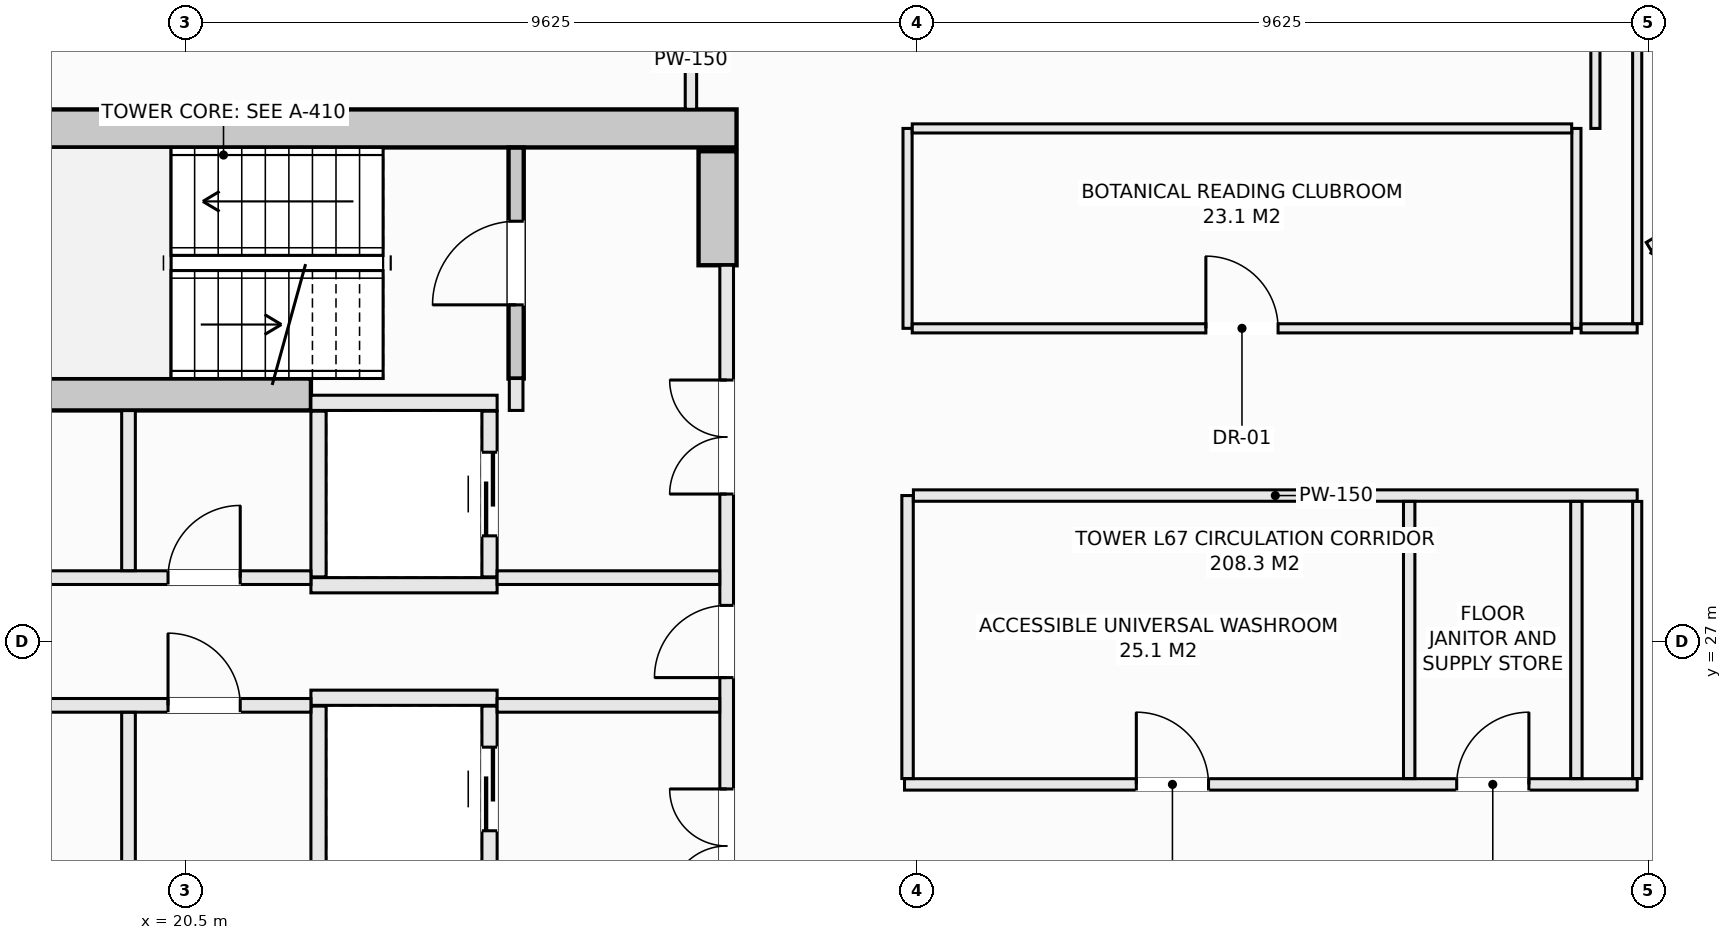
"""IFC4 building model, lengths in metres.
Left out: names, types, materials, properties, quantities, classifications, styles, units other than length and angle.
Written with IfcOpenShell. Run it as: python <this file> out.ifc"""

import sys

from ifc_helpers import new_model, si_unit, direction, frame, frame_2d, origin, place, context, subcontext, project, spatial, rectangle, extrude, element, fill, save


model = new_model("IFC4")
c1 = context("Model", 3, precision=1e-05, world=origin(), true_north=direction((0.0, 1.0)))
c2 = subcontext(c1, "Body", "Model", "MODEL_VIEW")
j1 = project(units=[si_unit("LENGTHUNIT", "METRE"), si_unit("PLANEANGLEUNIT", "RADIAN")], contexts=[c1])
p1 = place(None, origin())
s1 = spatial("IfcSite", under=j1, at=p1, CompositionType="ELEMENT")
p2 = place(p1, origin())
s2 = spatial("IfcBuilding", under=s1, at=p2, CompositionType="ELEMENT")
p3 = place(p2, frame((0.0, 0.0, 249.2)))
s3 = spatial("IfcBuildingStorey", under=s2, at=p3, CompositionType="ELEMENT", Elevation=249.2)
p4 = place(p3, frame((14.25, 33.75, -0.27), z_axis=(0.0, 0.0, 1.0), x_axis=(1.0, 0.0, 0.0)))
e1 = element("IfcWall", 1, at=p4, inside=s3, PredefinedType="SHEAR", context=c2, shape_type="SweptSolid", body=[
    extrude(rectangle(XDim=13.5, YDim=0.5, at=frame_2d((6.75, 0.0))), origin(), (0.0, 0.0, 1.0), 3.3),
])
p5 = place(p3, frame((27.5, 31.95, -0.27), z_axis=(0.0, 0.0, 1.0), x_axis=(0.0, 1.0, 0.0)))
e2 = element("IfcWall", 2, at=p5, inside=s3, PredefinedType="SHEAR", context=c2, shape_type="SweptSolid", body=[
    extrude(rectangle(XDim=1.5, YDim=0.5, at=frame_2d((0.75, 0.0))), origin(), (0.0, 0.0, 1.0), 3.3),
])
p6 = place(p3, frame((14.85, 30.25, -0.27), z_axis=(0.0, 0.0, 1.0), x_axis=(1.0, 0.0, 0.0)))
e3 = element("IfcWall", 3, at=p6, inside=s3, PredefinedType="SHEAR", context=c2, shape_type="SweptSolid", body=[
    extrude(rectangle(XDim=7.3, YDim=0.42, at=frame_2d((3.65, 0.0))), origin(), (0.0, 0.0, 1.0), 3.3),
])
p7 = place(p3, frame((24.85, 30.46, -0.27), z_axis=(0.0, 0.0, 1.0), x_axis=(0.0, 1.0, 0.0)))
e4 = element("IfcWall", 4, at=p7, inside=s3, PredefinedType="SHEAR", context=c2, shape_type="SweptSolid", body=[
    extrude(rectangle(XDim=3.038, YDim=0.2, at=frame_2d((1.519, 0.0))), origin(), (0.0, 0.0, 1.0), 3.3),
])
p8 = place(p7, frame((0.969, 0.0, 0.27)))
e5 = element("IfcOpeningElement", 5, at=p8, cuts=e4, PredefinedType="OPENING", context=c2, shape_type="SweptSolid", body=[
    extrude(rectangle(XDim=1.1, YDim=2.15, at=frame_2d((0.55, 1.075))), frame((0.0, 0.11, 0.0), z_axis=(0.0, -1.0, 0.0), x_axis=(1.0, 0.0, 0.0)), (0.0, 0.0, 1.0), 0.22),
])
for number, where, z_axis, x_axis in (
    (6, (22.15, 30.14, 0.0), (0.0, 0.0, 1.0), (1.0, 0.0, 0.0)),
    (7, (22.15, 27.74, 0.0), (0.0, 0.0, 1.0), (1.0, 0.0, 0.0)),
):
    element("IfcWall", number, at=place(p3, frame(where, z_axis=z_axis, x_axis=x_axis)), inside=s3, PredefinedType="SOLIDWALL", context=c2, shape_type="SweptSolid", body=[
        extrude(rectangle(XDim=2.45, YDim=0.2, at=frame_2d((1.225, 0.0))), origin(), (0.0, 0.0, 1.0), 3.03),
    ])
p9 = place(p3, frame((22.25, 27.85, 0.0), z_axis=(0.0, 0.0, 1.0), x_axis=(0.0, 1.0, 0.0)))
e8 = element("IfcWall", 8, at=p9, inside=s3, PredefinedType="SOLIDWALL", context=c2, shape_type="SweptSolid", body=[
    extrude(rectangle(XDim=2.18, YDim=0.2, at=frame_2d((1.09, 0.0))), origin(), (0.0, 0.0, 1.0), 3.03),
])
p10 = place(p3, frame((24.5, 27.85, 0.0), z_axis=(0.0, 0.0, 1.0), x_axis=(0.0, 1.0, 0.0)))
e9 = element("IfcWall", 9, at=p10, inside=s3, PredefinedType="SOLIDWALL", context=c2, shape_type="SweptSolid", body=[
    extrude(rectangle(XDim=2.18, YDim=0.2, at=frame_2d((1.09, 0.0))), origin(), (0.0, 0.0, 1.0), 3.03),
])
p11 = place(p10, frame((0.54, 0.0, 0.0)))
e10 = element("IfcOpeningElement", 10, at=p11, cuts=e9, PredefinedType="OPENING", context=c2, shape_type="SweptSolid", body=[
    extrude(rectangle(XDim=1.1, YDim=2.2, at=frame_2d((0.55, 1.1))), frame((0.0, 0.11, 0.0), z_axis=(0.0, -1.0, 0.0), x_axis=(1.0, 0.0, 0.0)), (0.0, 0.0, 1.0), 0.22),
])
p12 = place(p3, frame((22.15, 26.26, 0.0), z_axis=(0.0, 0.0, 1.0), x_axis=(1.0, 0.0, 0.0)))
e11 = element("IfcWall", 11, at=p12, inside=s3, PredefinedType="SOLIDWALL", context=c2, shape_type="SweptSolid", body=[
    extrude(rectangle(XDim=2.45, YDim=0.2, at=frame_2d((1.225, 0.0))), origin(), (0.0, 0.0, 1.0), 3.03),
])
p13 = place(p3, frame((22.25, 23.97, 0.0), z_axis=(0.0, 0.0, 1.0), x_axis=(0.0, 1.0, 0.0)))
e12 = element("IfcWall", 12, at=p13, inside=s3, PredefinedType="SOLIDWALL", context=c2, shape_type="SweptSolid", body=[
    extrude(rectangle(XDim=2.18, YDim=0.2, at=frame_2d((1.09, 0.0))), origin(), (0.0, 0.0, 1.0), 3.03),
])
p14 = place(p3, frame((24.5, 23.97, 0.0), z_axis=(0.0, 0.0, 1.0), x_axis=(0.0, 1.0, 0.0)))
e13 = element("IfcWall", 13, at=p14, inside=s3, PredefinedType="SOLIDWALL", context=c2, shape_type="SweptSolid", body=[
    extrude(rectangle(XDim=2.18, YDim=0.2, at=frame_2d((1.09, 0.0))), origin(), (0.0, 0.0, 1.0), 3.03),
])
p15 = place(p14, frame((0.54, 0.0, 0.0)))
e14 = element("IfcOpeningElement", 14, at=p15, cuts=e13, PredefinedType="OPENING", context=c2, shape_type="SweptSolid", body=[
    extrude(rectangle(XDim=1.1, YDim=2.2, at=frame_2d((0.55, 1.1))), frame((0.0, 0.11, 0.0), z_axis=(0.0, -1.0, 0.0), x_axis=(1.0, 0.0, 0.0)), (0.0, 0.0, 1.0), 0.22),
])
p16 = place(p3, frame((24.85, 30.04, 0.0), z_axis=(0.0, 0.0, 1.0), x_axis=(0.0, 1.0, 0.0)))
e15 = element("IfcWall", 15, at=p16, inside=s3, PredefinedType="SOLIDWALL", context=c2, shape_type="SweptSolid", body=[
    extrude(rectangle(XDim=0.42, YDim=0.18, at=frame_2d((0.21, 0.0))), origin(), (0.0, 0.0, 1.0), 3.03),
])
p17 = place(p3, frame((27.62, 22.05, 0.0), z_axis=(0.0, 0.0, 1.0), x_axis=(0.0, 1.0, 0.0)))
e16 = element("IfcWall", 16, at=p17, inside=s3, PredefinedType="SOLIDWALL", context=c2, shape_type="SweptSolid", body=[
    extrude(rectangle(XDim=9.9, YDim=0.18, at=frame_2d((4.95, 0.0))), origin(), (0.0, 0.0, 1.0), 3.03),
])
p18 = place(p17, frame((4.475, 0.0, 0.0)))
e17 = element("IfcOpeningElement", 17, at=p18, cuts=e16, PredefinedType="OPENING", context=c2, shape_type="SweptSolid", body=[
    extrude(rectangle(XDim=0.95, YDim=2.1, at=frame_2d((0.475, 1.05))), frame((0.0, 0.1, 0.0), z_axis=(0.0, -1.0, 0.0), x_axis=(1.0, 0.0, 0.0)), (0.0, 0.0, 1.0), 0.2),
])
p19 = place(p17, frame((6.89, 0.0, 0.0)))
e18 = element("IfcOpeningElement", 18, at=p19, cuts=e16, PredefinedType="OPENING", context=c2, shape_type="SweptSolid", body=[
    extrude(rectangle(XDim=1.5, YDim=2.2, at=frame_2d((0.75, 1.1))), frame((0.0, 0.1, 0.0), z_axis=(0.0, -1.0, 0.0), x_axis=(1.0, 0.0, 0.0)), (0.0, 0.0, 1.0), 0.2),
])
p20 = place(p17, frame((1.51, 0.0, 0.0)))
e19 = element("IfcOpeningElement", 19, at=p20, cuts=e16, PredefinedType="OPENING", context=c2, shape_type="SweptSolid", body=[
    extrude(rectangle(XDim=1.5, YDim=2.2, at=frame_2d((0.75, 1.1))), frame((0.0, 0.1, 0.0), z_axis=(0.0, -1.0, 0.0), x_axis=(1.0, 0.0, 0.0)), (0.0, 0.0, 1.0), 0.2),
])
p21 = place(p3, frame((15.25, 27.84, 0.0), z_axis=(0.0, 0.0, 1.0), x_axis=(1.0, 0.0, 0.0)))
e20 = element("IfcWall", 20, at=p21, inside=s3, PredefinedType="SOLIDWALL", context=c2, shape_type="SweptSolid", body=[
    extrude(rectangle(XDim=6.9, YDim=0.18, at=frame_2d((3.45, 0.0))), origin(), (0.0, 0.0, 1.0), 3.03),
])
p22 = place(p21, frame((5.02, 0.0, 0.0)))
e21 = element("IfcOpeningElement", 21, at=p22, cuts=e20, PredefinedType="OPENING", context=c2, shape_type="SweptSolid", body=[
    extrude(rectangle(XDim=0.95, YDim=2.1, at=frame_2d((0.475, 1.05))), frame((0.0, 0.1, 0.0), z_axis=(0.0, -1.0, 0.0), x_axis=(1.0, 0.0, 0.0)), (0.0, 0.0, 1.0), 0.2),
])
p23 = place(p21, frame((1.98, 0.0, 0.0)))
e22 = element("IfcOpeningElement", 22, at=p23, cuts=e20, PredefinedType="OPENING", context=c2, shape_type="SweptSolid", body=[
    extrude(rectangle(XDim=0.95, YDim=2.1, at=frame_2d((0.475, 1.05))), frame((0.0, 0.1, 0.0), z_axis=(0.0, -1.0, 0.0), x_axis=(1.0, 0.0, 0.0)), (0.0, 0.0, 1.0), 0.2),
])
p24 = place(p3, frame((24.6, 27.84, 0.0), z_axis=(0.0, 0.0, 1.0), x_axis=(1.0, 0.0, 0.0)))
e23 = element("IfcWall", 23, at=p24, inside=s3, PredefinedType="SOLIDWALL", context=c2, shape_type="SweptSolid", body=[
    extrude(rectangle(XDim=2.928, YDim=0.18, at=frame_2d((1.464, 0.0))), origin(), (0.0, 0.0, 1.0), 3.03),
])
p25 = place(p3, frame((15.25, 26.16, 0.0), z_axis=(0.0, 0.0, 1.0), x_axis=(1.0, 0.0, 0.0)))
e24 = element("IfcWall", 24, at=p25, inside=s3, PredefinedType="SOLIDWALL", context=c2, shape_type="SweptSolid", body=[
    extrude(rectangle(XDim=6.9, YDim=0.18, at=frame_2d((3.45, 0.0))), origin(), (0.0, 0.0, 1.0), 3.03),
])
p26 = place(p25, frame((5.02, 0.0, 0.0)))
e25 = element("IfcOpeningElement", 25, at=p26, cuts=e24, PredefinedType="OPENING", context=c2, shape_type="SweptSolid", body=[
    extrude(rectangle(XDim=0.95, YDim=2.1, at=frame_2d((0.475, 1.05))), frame((0.0, 0.1, 0.0), z_axis=(0.0, -1.0, 0.0), x_axis=(1.0, 0.0, 0.0)), (0.0, 0.0, 1.0), 0.2),
])
p27 = place(p25, frame((1.98, 0.0, 0.0)))
e26 = element("IfcOpeningElement", 26, at=p27, cuts=e24, PredefinedType="OPENING", context=c2, shape_type="SweptSolid", body=[
    extrude(rectangle(XDim=0.95, YDim=2.1, at=frame_2d((0.475, 1.05))), frame((0.0, 0.1, 0.0), z_axis=(0.0, -1.0, 0.0), x_axis=(1.0, 0.0, 0.0)), (0.0, 0.0, 1.0), 0.2),
])
p28 = place(p3, frame((24.6, 26.16, 0.0), z_axis=(0.0, 0.0, 1.0), x_axis=(1.0, 0.0, 0.0)))
e27 = element("IfcWall", 27, at=p28, inside=s3, PredefinedType="SOLIDWALL", context=c2, shape_type="SweptSolid", body=[
    extrude(rectangle(XDim=2.928, YDim=0.18, at=frame_2d((1.464, 0.0))), origin(), (0.0, 0.0, 1.0), 3.03),
])
for number, where, z_axis, x_axis in (
    (28, (19.75, 23.962, 0.0), (0.0, 0.0, 1.0), (0.0, 1.0, 0.0)),
    (29, (19.75, 27.932, 0.0), (0.0, 0.0, 1.0), (0.0, 1.0, 0.0)),
):
    element("IfcWall", number, at=place(p3, frame(where, z_axis=z_axis, x_axis=x_axis)), inside=s3, PredefinedType="SOLIDWALL", context=c2, shape_type="SweptSolid", body=[
        extrude(rectangle(XDim=2.106, YDim=0.18, at=frame_2d((1.053, 0.0))), origin(), (0.0, 0.0, 1.0), 3.03),
    ])
p29 = place(p3, frame((27.15, 34.002, 0.0), z_axis=(0.0, 0.0, 1.0), x_axis=(0.0, 1.0, 0.0)))
e30 = element("IfcWall", 30, at=p29, inside=s3, PredefinedType="PARTITIONING", context=c2, shape_type="SweptSolid", body=[
    extrude(rectangle(XDim=4.198, YDim=0.15, at=frame_2d((2.099, 0.0))), origin(), (0.0, 0.0, 1.0), 3.03),
])
p30 = place(p29, frame((1.998, 0.0, 0.0)))
e31 = element("IfcOpeningElement", 31, at=p30, cuts=e30, PredefinedType="OPENING", context=c2, shape_type="SweptSolid", body=[
    extrude(rectangle(XDim=0.95, YDim=2.1, at=frame_2d((0.475, 1.05))), frame((0.0, 0.085, 0.0), z_axis=(0.0, -1.0, 0.0), x_axis=(1.0, 0.0, 0.0)), (0.0, 0.0, 1.0), 0.17),
])
p31 = place(p3, frame((29.96, 25.12, 0.0), z_axis=(0.0, 0.0, 1.0), x_axis=(1.0, 0.0, 0.0)))
e32 = element("IfcWall", 32, at=p31, inside=s3, PredefinedType="PARTITIONING", context=c2, shape_type="SweptSolid", body=[
    extrude(rectangle(XDim=9.64, YDim=0.15, at=frame_2d((4.82, 0.0))), origin(), (0.0, 0.0, 1.0), 3.03),
])
p32 = place(p31, frame((3.05, 0.0, 0.0)))
e33 = element("IfcOpeningElement", 33, at=p32, cuts=e32, PredefinedType="OPENING", context=c2, shape_type="SweptSolid", body=[
    extrude(rectangle(XDim=0.95, YDim=2.1, at=frame_2d((0.475, 1.05))), frame((0.0, 0.085, 0.0), z_axis=(0.0, -1.0, 0.0), x_axis=(1.0, 0.0, 0.0)), (0.0, 0.0, 1.0), 0.17),
])
p33 = place(p31, frame((7.265, 0.0, 0.0)))
e34 = element("IfcOpeningElement", 34, at=p33, cuts=e32, PredefinedType="OPENING", context=c2, shape_type="SweptSolid", body=[
    extrude(rectangle(XDim=0.95, YDim=2.1, at=frame_2d((0.475, 1.05))), frame((0.0, 0.085, 0.0), z_axis=(0.0, -1.0, 0.0), x_axis=(1.0, 0.0, 0.0)), (0.0, 0.0, 1.0), 0.17),
])
p34 = place(p3, frame((30.0, 25.197, 0.0), z_axis=(0.0, 0.0, 1.0), x_axis=(0.0, 1.0, 0.0)))
e35 = element("IfcWall", 35, at=p34, inside=s3, PredefinedType="PARTITIONING", context=c2, shape_type="SweptSolid", body=[
    extrude(rectangle(XDim=3.723, YDim=0.15, at=frame_2d((1.861, 0.0))), origin(), (0.0, 0.0, 1.0), 3.03),
])
p35 = place(p3, frame((30.0, 31.12, 0.0), z_axis=(0.0, 0.0, 1.0), x_axis=(0.0, 1.0, 0.0)))
e36 = element("IfcWall", 36, at=p35, inside=s3, PredefinedType="PARTITIONING", context=c2, shape_type="SweptSolid", body=[
    extrude(rectangle(XDim=2.63, YDim=0.12, at=frame_2d((1.315, 0.0))), origin(), (0.0, 0.0, 1.0), 3.03),
])
p36 = place(p3, frame((30.077, 28.92, 0.0), z_axis=(0.0, 0.0, 1.0), x_axis=(1.0, 0.0, 0.0)))
e37 = element("IfcWall", 37, at=p36, inside=s3, PredefinedType="PARTITIONING", context=c2, shape_type="SweptSolid", body=[
    extrude(rectangle(XDim=9.523, YDim=0.15, at=frame_2d((4.762, 0.0))), origin(), (0.0, 0.0, 1.0), 3.03),
])
for number, where, z_axis, x_axis in (
    (38, (36.6, 25.197, 0.0), (0.0, 0.0, 1.0), (0.0, 1.0, 0.0)),
    (39, (38.8, 25.197, 0.0), (0.0, 0.0, 1.0), (0.0, 1.0, 0.0)),
):
    element("IfcWall", number, at=place(p3, frame(where, z_axis=z_axis, x_axis=x_axis)), inside=s3, PredefinedType="PARTITIONING", context=c2, shape_type="SweptSolid", body=[
        extrude(rectangle(XDim=3.646, YDim=0.15, at=frame_2d((1.823, 0.0))), origin(), (0.0, 0.0, 1.0), 3.03),
    ])
p37 = place(p3, frame((38.8, 31.12, 0.0), z_axis=(0.0, 0.0, 1.0), x_axis=(0.0, 1.0, 0.0)))
e40 = element("IfcWall", 40, at=p37, inside=s3, PredefinedType="PARTITIONING", context=c2, shape_type="SweptSolid", body=[
    extrude(rectangle(XDim=2.63, YDim=0.12, at=frame_2d((1.315, 0.0))), origin(), (0.0, 0.0, 1.0), 3.03),
])
p38 = place(p3, frame((30.062, 31.12, 0.0), z_axis=(0.0, 0.0, 1.0), x_axis=(1.0, 0.0, 0.0)))
e41 = element("IfcWall", 41, at=p38, inside=s3, PredefinedType="PARTITIONING", context=c2, shape_type="SweptSolid", body=[
    extrude(rectangle(XDim=8.676, YDim=0.12, at=frame_2d((4.338, 0.0))), origin(), (0.0, 0.0, 1.0), 3.03),
])
p39 = place(p38, frame((3.863, 0.0, 0.0)))
e42 = element("IfcOpeningElement", 42, at=p39, cuts=e41, PredefinedType="OPENING", context=c2, shape_type="SweptSolid", body=[
    extrude(rectangle(XDim=0.95, YDim=2.1, at=frame_2d((0.475, 1.05))), frame((0.0, 0.07, 0.0), z_axis=(0.0, -1.0, 0.0), x_axis=(1.0, 0.0, 0.0)), (0.0, 0.0, 1.0), 0.14),
])
p40 = place(p3, frame((38.862, 31.12, 0.0), z_axis=(0.0, 0.0, 1.0), x_axis=(1.0, 0.0, 0.0)))
e43 = element("IfcWall", 43, at=p40, inside=s3, PredefinedType="PARTITIONING", context=c2, shape_type="SweptSolid", body=[
    extrude(rectangle(XDim=0.738, YDim=0.12, at=frame_2d((0.369, 0.0))), origin(), (0.0, 0.0, 1.0), 3.03),
])
p41 = place(p3, frame((30.062, 33.75, 0.0), z_axis=(0.0, 0.0, 1.0), x_axis=(1.0, 0.0, 0.0)))
e44 = element("IfcWall", 44, at=p41, inside=s3, PredefinedType="PARTITIONING", context=c2, shape_type="SweptSolid", body=[
    extrude(rectangle(XDim=8.676, YDim=0.12, at=frame_2d((4.338, 0.0))), origin(), (0.0, 0.0, 1.0), 3.03),
])
p42 = place(p3, frame((39.05, 33.75, 0.0), z_axis=(0.0, 0.0, 1.0), x_axis=(0.0, 1.0, 0.0)))
e45 = element("IfcWall", 45, at=p42, inside=s3, PredefinedType="PARTITIONING", context=c2, shape_type="SweptSolid", body=[
    extrude(rectangle(XDim=1.938, YDim=0.12, at=frame_2d((0.969, 0.0))), origin(), (0.0, 0.0, 1.0), 3.03),
])
p43 = place(p3, frame((39.6, 25.197, 0.0), z_axis=(0.0, 0.0, 1.0), x_axis=(0.0, 1.0, 0.0)))
e46 = element("IfcWall", 46, at=p43, inside=s3, PredefinedType="PARTITIONING", context=c2, shape_type="SweptSolid", body=[
    extrude(rectangle(XDim=3.646, YDim=0.12, at=frame_2d((1.823, 0.0))), origin(), (0.0, 0.0, 1.0), 3.03),
])
p44 = place(p3, frame((39.6, 31.182, 0.0), z_axis=(0.0, 0.0, 1.0), x_axis=(0.0, 1.0, 0.0)))
e47 = element("IfcWall", 47, at=p44, inside=s3, PredefinedType="PARTITIONING", context=c2, shape_type="SweptSolid", body=[
    extrude(rectangle(XDim=7.866, YDim=0.12, at=frame_2d((3.933, 0.0))), origin(), (0.0, 0.0, 1.0), 3.03),
])
p45 = place(p3, frame((39.75, 32.199, 0.0), z_axis=(0.0, 0.0, 1.0), x_axis=(0.857702120906, 0.514146935996, 0.0)))
e48 = element("IfcWall", 48, at=p45, inside=s3, PredefinedType="PARTITIONING", context=c2, shape_type="SweptSolid", body=[
    extrude(rectangle(XDim=1.441, YDim=0.12, at=frame_2d((0.721, 0.0))), origin(), (0.0, 0.0, 1.0), 3.03),
])
p46 = place(p3, frame((39.81, 32.163, 0.0), z_axis=(0.0, 0.0, 1.0), x_axis=(0.858011245414, -0.513630901273, 0.0)))
e49 = element("IfcWall", 49, at=p46, inside=s3, PredefinedType="PARTITIONING", context=c2, shape_type="SweptSolid", body=[
    extrude(rectangle(XDim=1.37, YDim=0.12, at=frame_2d((0.685, 0.0))), origin(), (0.0, 0.0, 1.0), 3.03),
])
p47 = place(p8, origin())
e50 = element("IfcDoor", 50, at=p47, inside=s3, OperationType="SINGLE_SWING_LEFT", PredefinedType="DOOR", context=c2, shape_type="SweptSolid", body=[
    extrude(rectangle(XDim=1.1, YDim=2.15, at=frame_2d((0.55, 1.075))), frame((0.0, 0.025, 0.0), z_axis=(0.0, -1.0, 0.0), x_axis=(1.0, 0.0, 0.0)), (0.0, 0.0, 1.0), 0.05),
])
fill(e5, e50)
p48 = place(p11, origin())
e51 = element("IfcDoor", 51, at=p48, inside=s3, OperationType="SLIDING_TO_LEFT", PredefinedType="DOOR", context=c2, shape_type="SweptSolid", body=[
    extrude(rectangle(XDim=1.1, YDim=2.2, at=frame_2d((0.55, 1.1))), frame((0.0, 0.025, 0.0), z_axis=(0.0, -1.0, 0.0), x_axis=(1.0, 0.0, 0.0)), (0.0, 0.0, 1.0), 0.05),
])
fill(e10, e51)
p49 = place(p15, origin())
e52 = element("IfcDoor", 52, at=p49, inside=s3, OperationType="SLIDING_TO_LEFT", PredefinedType="DOOR", context=c2, shape_type="SweptSolid", body=[
    extrude(rectangle(XDim=1.1, YDim=2.2, at=frame_2d((0.55, 1.1))), frame((0.0, 0.025, 0.0), z_axis=(0.0, -1.0, 0.0), x_axis=(1.0, 0.0, 0.0)), (0.0, 0.0, 1.0), 0.05),
])
fill(e14, e52)
p50 = place(p18, origin())
e53 = element("IfcDoor", 53, at=p50, inside=s3, OperationType="SINGLE_SWING_LEFT", PredefinedType="DOOR", context=c2, shape_type="SweptSolid", body=[
    extrude(rectangle(XDim=0.95, YDim=2.1, at=frame_2d((0.475, 1.05))), frame((0.0, 0.025, 0.0), z_axis=(0.0, -1.0, 0.0), x_axis=(1.0, 0.0, 0.0)), (0.0, 0.0, 1.0), 0.05),
])
fill(e17, e53)
p51 = place(p19, origin())
e54 = element("IfcDoor", 54, at=p51, inside=s3, OperationType="DOUBLE_DOOR_SINGLE_SWING", PredefinedType="DOOR", context=c2, shape_type="SweptSolid", body=[
    extrude(rectangle(XDim=1.5, YDim=2.2, at=frame_2d((0.75, 1.1))), frame((0.0, 0.025, 0.0), z_axis=(0.0, -1.0, 0.0), x_axis=(1.0, 0.0, 0.0)), (0.0, 0.0, 1.0), 0.05),
])
fill(e18, e54)
p52 = place(p20, origin())
e55 = element("IfcDoor", 55, at=p52, inside=s3, OperationType="DOUBLE_DOOR_SINGLE_SWING", PredefinedType="DOOR", context=c2, shape_type="SweptSolid", body=[
    extrude(rectangle(XDim=1.5, YDim=2.2, at=frame_2d((0.75, 1.1))), frame((0.0, 0.025, 0.0), z_axis=(0.0, -1.0, 0.0), x_axis=(1.0, 0.0, 0.0)), (0.0, 0.0, 1.0), 0.05),
])
fill(e19, e55)
p53 = place(p22, origin())
e56 = element("IfcDoor", 56, at=p53, inside=s3, OperationType="SINGLE_SWING_RIGHT", PredefinedType="DOOR", context=c2, shape_type="SweptSolid", body=[
    extrude(rectangle(XDim=0.95, YDim=2.1, at=frame_2d((0.475, 1.05))), frame((0.0, 0.025, 0.0), z_axis=(0.0, -1.0, 0.0), x_axis=(1.0, 0.0, 0.0)), (0.0, 0.0, 1.0), 0.05),
])
fill(e21, e56)
p54 = place(p26, origin())
e57 = element("IfcDoor", 57, at=p54, inside=s3, OperationType="SINGLE_SWING_LEFT", PredefinedType="DOOR", context=c2, shape_type="SweptSolid", body=[
    extrude(rectangle(XDim=0.95, YDim=2.1, at=frame_2d((0.475, 1.05))), frame((0.0, 0.025, 0.0), z_axis=(0.0, -1.0, 0.0), x_axis=(1.0, 0.0, 0.0)), (0.0, 0.0, 1.0), 0.05),
])
fill(e25, e57)
p55 = place(p32, origin())
e58 = element("IfcDoor", 58, at=p55, inside=s3, OperationType="SINGLE_SWING_LEFT", PredefinedType="DOOR", context=c2, shape_type="SweptSolid", body=[
    extrude(rectangle(XDim=0.95, YDim=2.1, at=frame_2d((0.475, 1.05))), frame((0.0, 0.025, 0.0), z_axis=(0.0, -1.0, 0.0), x_axis=(1.0, 0.0, 0.0)), (0.0, 0.0, 1.0), 0.05),
])
fill(e33, e58)
p56 = place(p33, origin())
e59 = element("IfcDoor", 59, at=p56, inside=s3, OperationType="SINGLE_SWING_RIGHT", PredefinedType="DOOR", context=c2, shape_type="SweptSolid", body=[
    extrude(rectangle(XDim=0.95, YDim=2.1, at=frame_2d((0.475, 1.05))), frame((0.0, 0.025, 0.0), z_axis=(0.0, -1.0, 0.0), x_axis=(1.0, 0.0, 0.0)), (0.0, 0.0, 1.0), 0.05),
])
fill(e34, e59)
p57 = place(p39, origin())
e60 = element("IfcDoor", 60, at=p57, inside=s3, OperationType="SINGLE_SWING_LEFT", PredefinedType="DOOR", context=c2, shape_type="SweptSolid", body=[
    extrude(rectangle(XDim=0.95, YDim=2.1, at=frame_2d((0.475, 1.05))), frame((0.0, 0.025, 0.0), z_axis=(0.0, -1.0, 0.0), x_axis=(1.0, 0.0, 0.0)), (0.0, 0.0, 1.0), 0.05),
])
fill(e42, e60)
save(model, sys.argv[1])
